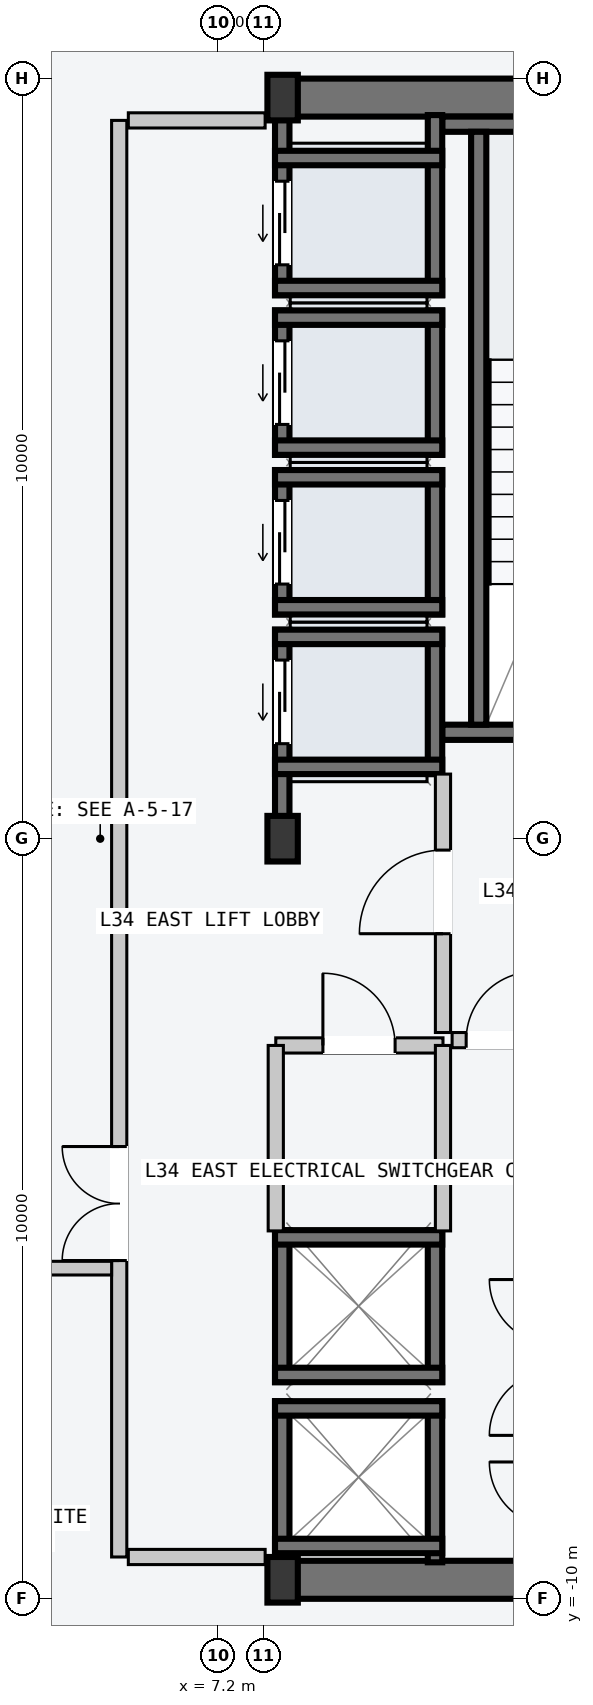
"""IFC4 building model, lengths in metres.
Left out: names, types, materials, properties, quantities, classifications, styles, units other than length and angle.
Written with IfcOpenShell. Run it as: python <this file> out.ifc"""

import sys

from ifc_helpers import new_model, si_unit, direction, frame, frame_2d, origin, origin_2d, place, context, subcontext, project, spatial, rectangle, i_section, extrude, element, fill, save


model = new_model("IFC4")
c1 = context("Model", 3, precision=1e-05, world=origin(), true_north=direction((0.0, 1.0)))
c2 = subcontext(c1, "Body", "Model", "MODEL_VIEW")
j1 = project(units=[si_unit("LENGTHUNIT", "METRE"), si_unit("PLANEANGLEUNIT", "RADIAN")], contexts=[c1])
p1 = place(None, origin())
s1 = spatial("IfcSite", under=j1, at=p1, CompositionType="ELEMENT")
p2 = place(p1, origin())
s2 = spatial("IfcBuilding", under=s1, at=p2, CompositionType="ELEMENT")
p3 = place(p2, frame((0.0, 0.0, 131.4)))
s3 = spatial("IfcBuildingStorey", under=s2, at=p3, CompositionType="ELEMENT", Elevation=131.4)
for number, where, z_axis, x_axis in (
    (1, (8.07, -9.75, -0.2), (0.0, 0.0, 1.0), (1.0, 0.0, 0.0)),
    (2, (8.07, 9.75, -0.2), (0.0, 0.0, 1.0), (1.0, 0.0, 0.0)),
):
    element("IfcWall", number, at=place(p3, frame(where, z_axis=z_axis, x_axis=x_axis)), inside=s3, PredefinedType="SHEAR", context=c2, shape_type="SweptSolid", body=[
        extrude(rectangle(XDim=6.46, YDim=0.5, at=frame_2d((3.23, 0.0))), origin(), (0.0, 0.0, 1.0), 3.6),
    ])
p4 = place(p3, frame((10.15, 1.4, -0.2), z_axis=(0.0, 0.0, 1.0), x_axis=(1.0, 0.0, 0.0)))
e3 = element("IfcWall", 3, at=p4, inside=s3, PredefinedType="SOLIDWALL", context=c2, shape_type="SweptSolid", body=[
    extrude(rectangle(XDim=4.1, YDim=0.2, at=frame_2d((2.05, 0.0))), origin(), (0.0, 0.0, 1.0), 3.6),
])
p5 = place(p4, frame((1.5, 0.0, 0.2)))
e4 = element("IfcOpeningElement", 4, at=p5, cuts=e3, PredefinedType="OPENING", context=c2, shape_type="SweptSolid", body=[
    extrude(rectangle(XDim=1.12, YDim=2.18, at=frame_2d((0.56, 1.09))), frame((0.0, 0.11, 0.0), z_axis=(0.0, -1.0, 0.0), x_axis=(1.0, 0.0, 0.0)), (0.0, 0.0, 1.0), 0.22),
])
p6 = place(p3, frame((10.15, 9.4, -0.2), z_axis=(0.0, 0.0, 1.0), x_axis=(1.0, 0.0, 0.0)))
e5 = element("IfcWall", 5, at=p6, inside=s3, PredefinedType="SOLIDWALL", context=c2, shape_type="SweptSolid", body=[
    extrude(rectangle(XDim=4.1, YDim=0.2, at=frame_2d((2.05, 0.0))), origin(), (0.0, 0.0, 1.0), 3.6),
])
p7 = place(p3, frame((10.63, 1.5, -0.2), z_axis=(0.0, 0.0, 1.0), x_axis=(0.0, 1.0, 0.0)))
e6 = element("IfcWall", 6, at=p7, inside=s3, PredefinedType="SOLIDWALL", context=c2, shape_type="SweptSolid", body=[
    extrude(rectangle(XDim=7.8, YDim=0.2, at=frame_2d((3.9, 0.0))), origin(), (0.0, 0.0, 1.0), 3.6),
])
for number, where, z_axis, x_axis in (
    (7, (8.05, -9.75, 0.0), (0.0, 0.0, 1.0), (1.0, 0.0, 0.0)),
    (8, (8.05, 0.0, 0.0), (0.0, 0.0, 1.0), (1.0, 0.0, 0.0)),
    (9, (8.05, 9.75, 0.0), (0.0, 0.0, 1.0), (1.0, 0.0, 0.0)),
):
    element("IfcColumn", number, at=place(p3, frame(where, z_axis=z_axis, x_axis=x_axis)), inside=s3, PredefinedType="COLUMN", context=c2, shape_type="SweptSolid", body=[
        extrude(i_section(OverallWidth=0.4, OverallDepth=0.6, WebThickness=0.022, FlangeThickness=0.036, at=origin_2d()), origin(), (0.0, 0.0, 1.0), 3.6),
    ])
p8 = place(p3, frame((8.045, 0.21, -0.2), z_axis=(0.0, 0.0, 1.0), x_axis=(0.0, 1.0, 0.0)))
e10 = element("IfcWall", 10, at=p8, inside=s3, PredefinedType="SOLIDWALL", context=c2, shape_type="SweptSolid", body=[
    extrude(rectangle(XDim=2.54, YDim=0.19, at=frame_2d((1.27, 0.0))), origin(), (0.0, 0.0, 1.0), 3.6),
])
p9 = place(p8, frame((1.04, 0.0, 0.2)))
e11 = element("IfcOpeningElement", 11, at=p9, cuts=e10, PredefinedType="OPENING", context=c2, shape_type="SweptSolid", body=[
    extrude(rectangle(XDim=1.1, YDim=2.2, at=frame_2d((0.55, 1.1))), frame((0.0, 0.105, 0.0), z_axis=(0.0, -1.0, 0.0), x_axis=(1.0, 0.0, 0.0)), (0.0, 0.0, 1.0), 0.21),
])
p10 = place(p3, frame((10.055, 0.85, -0.2), z_axis=(0.0, 0.0, 1.0), x_axis=(0.0, 1.0, 0.0)))
e12 = element("IfcWall", 12, at=p10, inside=s3, PredefinedType="SOLIDWALL", context=c2, shape_type="SweptSolid", body=[
    extrude(rectangle(XDim=1.9, YDim=0.19, at=frame_2d((0.95, 0.0))), origin(), (0.0, 0.0, 1.0), 3.6),
])
for number, where, z_axis, x_axis in (
    (13, (7.95, 2.655, -0.2), (0.0, 0.0, 1.0), (1.0, 0.0, 0.0)),
    (14, (7.95, 0.945, -0.2), (0.0, 0.0, 1.0), (1.0, 0.0, 0.0)),
):
    element("IfcWall", number, at=place(p3, frame(where, z_axis=z_axis, x_axis=x_axis)), inside=s3, PredefinedType="SOLIDWALL", context=c2, shape_type="SweptSolid", body=[
        extrude(rectangle(XDim=2.2, YDim=0.19, at=frame_2d((1.1, 0.0))), origin(), (0.0, 0.0, 1.0), 3.6),
    ])
p11 = place(p3, frame((8.045, 2.95, -0.2), z_axis=(0.0, 0.0, 1.0), x_axis=(0.0, 1.0, 0.0)))
e15 = element("IfcWall", 15, at=p11, inside=s3, PredefinedType="SOLIDWALL", context=c2, shape_type="SweptSolid", body=[
    extrude(rectangle(XDim=1.9, YDim=0.19, at=frame_2d((0.95, 0.0))), origin(), (0.0, 0.0, 1.0), 3.6),
])
p12 = place(p11, frame((0.4, 0.0, 0.2)))
e16 = element("IfcOpeningElement", 16, at=p12, cuts=e15, PredefinedType="OPENING", context=c2, shape_type="SweptSolid", body=[
    extrude(rectangle(XDim=1.1, YDim=2.2, at=frame_2d((0.55, 1.1))), frame((0.0, 0.105, 0.0), z_axis=(0.0, -1.0, 0.0), x_axis=(1.0, 0.0, 0.0)), (0.0, 0.0, 1.0), 0.21),
])
p13 = place(p3, frame((10.055, 2.95, -0.2), z_axis=(0.0, 0.0, 1.0), x_axis=(0.0, 1.0, 0.0)))
e17 = element("IfcWall", 17, at=p13, inside=s3, PredefinedType="SOLIDWALL", context=c2, shape_type="SweptSolid", body=[
    extrude(rectangle(XDim=1.9, YDim=0.19, at=frame_2d((0.95, 0.0))), origin(), (0.0, 0.0, 1.0), 3.6),
])
for number, where, z_axis, x_axis in (
    (18, (7.95, 4.755, -0.2), (0.0, 0.0, 1.0), (1.0, 0.0, 0.0)),
    (19, (7.95, 3.045, -0.2), (0.0, 0.0, 1.0), (1.0, 0.0, 0.0)),
):
    element("IfcWall", number, at=place(p3, frame(where, z_axis=z_axis, x_axis=x_axis)), inside=s3, PredefinedType="SOLIDWALL", context=c2, shape_type="SweptSolid", body=[
        extrude(rectangle(XDim=2.2, YDim=0.19, at=frame_2d((1.1, 0.0))), origin(), (0.0, 0.0, 1.0), 3.6),
    ])
p14 = place(p3, frame((8.045, 5.05, -0.2), z_axis=(0.0, 0.0, 1.0), x_axis=(0.0, 1.0, 0.0)))
e20 = element("IfcWall", 20, at=p14, inside=s3, PredefinedType="SOLIDWALL", context=c2, shape_type="SweptSolid", body=[
    extrude(rectangle(XDim=1.9, YDim=0.19, at=frame_2d((0.95, 0.0))), origin(), (0.0, 0.0, 1.0), 3.6),
])
p15 = place(p14, frame((0.4, 0.0, 0.2)))
e21 = element("IfcOpeningElement", 21, at=p15, cuts=e20, PredefinedType="OPENING", context=c2, shape_type="SweptSolid", body=[
    extrude(rectangle(XDim=1.1, YDim=2.2, at=frame_2d((0.55, 1.1))), frame((0.0, 0.105, 0.0), z_axis=(0.0, -1.0, 0.0), x_axis=(1.0, 0.0, 0.0)), (0.0, 0.0, 1.0), 0.21),
])
p16 = place(p3, frame((10.055, 5.05, -0.2), z_axis=(0.0, 0.0, 1.0), x_axis=(0.0, 1.0, 0.0)))
e22 = element("IfcWall", 22, at=p16, inside=s3, PredefinedType="SOLIDWALL", context=c2, shape_type="SweptSolid", body=[
    extrude(rectangle(XDim=1.9, YDim=0.19, at=frame_2d((0.95, 0.0))), origin(), (0.0, 0.0, 1.0), 3.6),
])
for number, where, z_axis, x_axis in (
    (23, (7.95, 6.855, -0.2), (0.0, 0.0, 1.0), (1.0, 0.0, 0.0)),
    (24, (7.95, 5.145, -0.2), (0.0, 0.0, 1.0), (1.0, 0.0, 0.0)),
):
    element("IfcWall", number, at=place(p3, frame(where, z_axis=z_axis, x_axis=x_axis)), inside=s3, PredefinedType="SOLIDWALL", context=c2, shape_type="SweptSolid", body=[
        extrude(rectangle(XDim=2.2, YDim=0.19, at=frame_2d((1.1, 0.0))), origin(), (0.0, 0.0, 1.0), 3.6),
    ])
p17 = place(p3, frame((8.045, 7.15, -0.2), z_axis=(0.0, 0.0, 1.0), x_axis=(0.0, 1.0, 0.0)))
e25 = element("IfcWall", 25, at=p17, inside=s3, PredefinedType="SOLIDWALL", context=c2, shape_type="SweptSolid", body=[
    extrude(rectangle(XDim=2.37, YDim=0.19, at=frame_2d((1.185, 0.0))), origin(), (0.0, 0.0, 1.0), 3.6),
])
p18 = place(p17, frame((0.4, 0.0, 0.2)))
e26 = element("IfcOpeningElement", 26, at=p18, cuts=e25, PredefinedType="OPENING", context=c2, shape_type="SweptSolid", body=[
    extrude(rectangle(XDim=1.1, YDim=2.2, at=frame_2d((0.55, 1.1))), frame((0.0, 0.105, 0.0), z_axis=(0.0, -1.0, 0.0), x_axis=(1.0, 0.0, 0.0)), (0.0, 0.0, 1.0), 0.21),
])
p19 = place(p3, frame((10.055, 7.15, -0.2), z_axis=(0.0, 0.0, 1.0), x_axis=(0.0, 1.0, 0.0)))
e27 = element("IfcWall", 27, at=p19, inside=s3, PredefinedType="SOLIDWALL", context=c2, shape_type="SweptSolid", body=[
    extrude(rectangle(XDim=2.37, YDim=0.19, at=frame_2d((1.185, 0.0))), origin(), (0.0, 0.0, 1.0), 3.6),
])
for number, where, z_axis, x_axis in (
    (28, (7.95, 8.955, -0.2), (0.0, 0.0, 1.0), (1.0, 0.0, 0.0)),
    (29, (7.95, 7.245, -0.2), (0.0, 0.0, 1.0), (1.0, 0.0, 0.0)),
):
    element("IfcWall", number, at=place(p3, frame(where, z_axis=z_axis, x_axis=x_axis)), inside=s3, PredefinedType="SOLIDWALL", context=c2, shape_type="SweptSolid", body=[
        extrude(rectangle(XDim=2.2, YDim=0.19, at=frame_2d((1.1, 0.0))), origin(), (0.0, 0.0, 1.0), 3.6),
    ])
for number, where, z_axis, x_axis in (
    (30, (8.045, -9.52, -0.2), (0.0, 0.0, 1.0), (0.0, 1.0, 0.0)),
    (31, (10.055, -9.52, -0.2), (0.0, 0.0, 1.0), (0.0, 1.0, 0.0)),
):
    element("IfcWall", number, at=place(p3, frame(where, z_axis=z_axis, x_axis=x_axis)), inside=s3, PredefinedType="SOLIDWALL", context=c2, shape_type="SweptSolid", body=[
        extrude(rectangle(XDim=2.12, YDim=0.19, at=frame_2d((1.06, 0.0))), origin(), (0.0, 0.0, 1.0), 3.6),
    ])
for number, where, z_axis, x_axis in (
    (32, (7.95, -7.495, -0.2), (0.0, 0.0, 1.0), (1.0, 0.0, 0.0)),
    (33, (7.95, -9.305, -0.2), (0.0, 0.0, 1.0), (1.0, 0.0, 0.0)),
):
    element("IfcWall", number, at=place(p3, frame(where, z_axis=z_axis, x_axis=x_axis)), inside=s3, PredefinedType="SOLIDWALL", context=c2, shape_type="SweptSolid", body=[
        extrude(rectangle(XDim=2.2, YDim=0.19, at=frame_2d((1.1, 0.0))), origin(), (0.0, 0.0, 1.0), 3.6),
    ])
for number, where, z_axis, x_axis in (
    (34, (8.045, -7.15, -0.2), (0.0, 0.0, 1.0), (0.0, 1.0, 0.0)),
    (35, (10.055, -7.15, -0.2), (0.0, 0.0, 1.0), (0.0, 1.0, 0.0)),
):
    element("IfcWall", number, at=place(p3, frame(where, z_axis=z_axis, x_axis=x_axis)), inside=s3, PredefinedType="SOLIDWALL", context=c2, shape_type="SweptSolid", body=[
        extrude(rectangle(XDim=2.0, YDim=0.19, at=frame_2d((1.0, 0.0))), origin(), (0.0, 0.0, 1.0), 3.6),
    ])
for number, where, z_axis, x_axis in (
    (36, (7.95, -5.245, -0.2), (0.0, 0.0, 1.0), (1.0, 0.0, 0.0)),
    (37, (7.95, -7.055, -0.2), (0.0, 0.0, 1.0), (1.0, 0.0, 0.0)),
):
    element("IfcWall", number, at=place(p3, frame(where, z_axis=z_axis, x_axis=x_axis)), inside=s3, PredefinedType="SOLIDWALL", context=c2, shape_type="SweptSolid", body=[
        extrude(rectangle(XDim=2.2, YDim=0.19, at=frame_2d((1.1, 0.0))), origin(), (0.0, 0.0, 1.0), 3.6),
    ])
p20 = place(p3, frame((5.9, -9.45, 0.0), z_axis=(0.0, 0.0, 1.0), x_axis=(0.0, 1.0, 0.0)))
e38 = element("IfcWall", 38, at=p20, inside=s3, PredefinedType="PARTITIONING", context=c2, shape_type="SweptSolid", body=[
    extrude(rectangle(XDim=18.9, YDim=0.2, at=frame_2d((9.45, 0.0))), origin(), (0.0, 0.0, 1.0), 3.4),
])
p21 = place(p20, frame((3.9, 0.0, 0.0)))
e39 = element("IfcOpeningElement", 39, at=p21, cuts=e38, PredefinedType="OPENING", context=c2, shape_type="SweptSolid", body=[
    extrude(rectangle(XDim=1.5, YDim=2.2, at=frame_2d((0.75, 1.1))), frame((0.0, 0.11, 0.0), z_axis=(0.0, -1.0, 0.0), x_axis=(1.0, 0.0, 0.0)), (0.0, 0.0, 1.0), 0.22),
])
for number, where, z_axis, x_axis in (
    (40, (6.02, -9.45, 0.0), (0.0, 0.0, 1.0), (1.0, 0.0, 0.0)),
    (41, (6.02, 9.45, 0.0), (0.0, 0.0, 1.0), (1.0, 0.0, 0.0)),
):
    element("IfcWall", number, at=place(p3, frame(where, z_axis=z_axis, x_axis=x_axis)), inside=s3, PredefinedType="PARTITIONING", context=c2, shape_type="SweptSolid", body=[
        extrude(rectangle(XDim=1.8, YDim=0.2, at=frame_2d((0.9, 0.0))), origin(), (0.0, 0.0, 1.0), 3.4),
    ])
p22 = place(p3, frame((10.16, -2.55, 0.0), z_axis=(0.0, 0.0, 1.0), x_axis=(0.0, 1.0, 0.0)))
e42 = element("IfcWall", 42, at=p22, inside=s3, PredefinedType="PARTITIONING", context=c2, shape_type="SweptSolid", body=[
    extrude(rectangle(XDim=3.4, YDim=0.2, at=frame_2d((1.7, 0.0))), origin(), (0.0, 0.0, 1.0), 3.4),
])
p23 = place(p22, frame((1.3, 0.0, 0.0)))
e43 = element("IfcOpeningElement", 43, at=p23, cuts=e42, PredefinedType="OPENING", context=c2, shape_type="SweptSolid", body=[
    extrude(rectangle(XDim=1.1, YDim=2.15, at=frame_2d((0.55, 1.075))), frame((0.0, 0.11, 0.0), z_axis=(0.0, -1.0, 0.0), x_axis=(1.0, 0.0, 0.0)), (0.0, 0.0, 1.0), 0.22),
])
p24 = place(p3, frame((10.28, -2.65, 0.0), z_axis=(0.0, 0.0, 1.0), x_axis=(1.0, 0.0, 0.0)))
e44 = element("IfcWall", 44, at=p24, inside=s3, PredefinedType="PARTITIONING", context=c2, shape_type="SweptSolid", body=[
    extrude(rectangle(XDim=1.27, YDim=0.2, at=frame_2d((0.635, 0.0))), origin(), (0.0, 0.0, 1.0), 3.4),
])
p25 = place(p24, frame((0.185, 0.0, 0.0)))
e45 = element("IfcOpeningElement", 45, at=p25, cuts=e44, PredefinedType="OPENING", context=c2, shape_type="SweptSolid", body=[
    extrude(rectangle(XDim=0.9, YDim=2.15, at=frame_2d((0.45, 1.075))), frame((0.0, 0.11, 0.0), z_axis=(0.0, -1.0, 0.0), x_axis=(1.0, 0.0, 0.0)), (0.0, 0.0, 1.0), 0.22),
])
p26 = place(p3, frame((7.96, -2.72, 0.0), z_axis=(0.0, 0.0, 1.0), x_axis=(1.0, 0.0, 0.0)))
e46 = element("IfcWall", 46, at=p26, inside=s3, PredefinedType="PARTITIONING", context=c2, shape_type="SweptSolid", body=[
    extrude(rectangle(XDim=2.2, YDim=0.2, at=frame_2d((1.1, 0.0))), origin(), (0.0, 0.0, 1.0), 3.4),
])
p27 = place(p26, frame((0.62, 0.0, 0.0)))
e47 = element("IfcOpeningElement", 47, at=p27, cuts=e46, PredefinedType="OPENING", context=c2, shape_type="SweptSolid", body=[
    extrude(rectangle(XDim=0.95, YDim=2.1, at=frame_2d((0.475, 1.05))), frame((0.0, 0.11, 0.0), z_axis=(0.0, -1.0, 0.0), x_axis=(1.0, 0.0, 0.0)), (0.0, 0.0, 1.0), 0.22),
])
for number, where, z_axis, x_axis in (
    (48, (7.96, -5.16, 0.0), (0.0, 0.0, 1.0), (0.0, 1.0, 0.0)),
    (49, (10.16, -5.16, 0.0), (0.0, 0.0, 1.0), (0.0, 1.0, 0.0)),
):
    element("IfcWall", number, at=place(p3, frame(where, z_axis=z_axis, x_axis=x_axis)), inside=s3, PredefinedType="PARTITIONING", context=c2, shape_type="SweptSolid", body=[
        extrude(rectangle(XDim=2.44, YDim=0.2, at=frame_2d((1.22, 0.0))), origin(), (0.0, 0.0, 1.0), 3.4),
    ])
p28 = place(p3, frame((-5.8, -5.65, 0.0), z_axis=(0.0, 0.0, 1.0), x_axis=(1.0, 0.0, 0.0)))
e50 = element("IfcWall", 50, at=p28, inside=s3, PredefinedType="PARTITIONING", context=c2, shape_type="SweptSolid", body=[
    extrude(rectangle(XDim=11.6, YDim=0.18, at=frame_2d((5.8, 0.0))), origin(), (0.0, 0.0, 1.0), 3.4),
])
p29 = place(p28, frame((5.1, 0.0, 0.0)))
e51 = element("IfcOpeningElement", 51, at=p29, cuts=e50, PredefinedType="OPENING", context=c2, shape_type="SweptSolid", body=[
    extrude(rectangle(XDim=1.4, YDim=2.2, at=frame_2d((0.7, 1.1))), frame((0.0, 0.1, 0.0), z_axis=(0.0, -1.0, 0.0), x_axis=(1.0, 0.0, 0.0)), (0.0, 0.0, 1.0), 0.2),
])
p30 = place(p9, origin())
e52 = element("IfcDoor", 52, at=p30, inside=s3, OperationType="SLIDING_TO_LEFT", PredefinedType="DOOR", context=c2, shape_type="SweptSolid", body=[
    extrude(rectangle(XDim=1.1, YDim=2.2, at=frame_2d((0.55, 1.1))), frame((0.0, 0.025, 0.0), z_axis=(0.0, -1.0, 0.0), x_axis=(1.0, 0.0, 0.0)), (0.0, 0.0, 1.0), 0.05),
])
fill(e11, e52)
p31 = place(p12, origin())
e53 = element("IfcDoor", 53, at=p31, inside=s3, OperationType="SLIDING_TO_LEFT", PredefinedType="DOOR", context=c2, shape_type="SweptSolid", body=[
    extrude(rectangle(XDim=1.1, YDim=2.2, at=frame_2d((0.55, 1.1))), frame((0.0, 0.025, 0.0), z_axis=(0.0, -1.0, 0.0), x_axis=(1.0, 0.0, 0.0)), (0.0, 0.0, 1.0), 0.05),
])
fill(e16, e53)
p32 = place(p15, origin())
e54 = element("IfcDoor", 54, at=p32, inside=s3, OperationType="SLIDING_TO_LEFT", PredefinedType="DOOR", context=c2, shape_type="SweptSolid", body=[
    extrude(rectangle(XDim=1.1, YDim=2.2, at=frame_2d((0.55, 1.1))), frame((0.0, 0.025, 0.0), z_axis=(0.0, -1.0, 0.0), x_axis=(1.0, 0.0, 0.0)), (0.0, 0.0, 1.0), 0.05),
])
fill(e21, e54)
p33 = place(p18, origin())
e55 = element("IfcDoor", 55, at=p33, inside=s3, OperationType="SLIDING_TO_LEFT", PredefinedType="DOOR", context=c2, shape_type="SweptSolid", body=[
    extrude(rectangle(XDim=1.1, YDim=2.2, at=frame_2d((0.55, 1.1))), frame((0.0, 0.025, 0.0), z_axis=(0.0, -1.0, 0.0), x_axis=(1.0, 0.0, 0.0)), (0.0, 0.0, 1.0), 0.05),
])
fill(e26, e55)
p34 = place(p21, origin())
e56 = element("IfcDoor", 56, at=p34, inside=s3, OperationType="DOUBLE_DOOR_SINGLE_SWING", PredefinedType="DOOR", context=c2, shape_type="SweptSolid", body=[
    extrude(rectangle(XDim=1.5, YDim=2.2, at=frame_2d((0.75, 1.1))), frame((0.0, 0.025, 0.0), z_axis=(0.0, -1.0, 0.0), x_axis=(1.0, 0.0, 0.0)), (0.0, 0.0, 1.0), 0.05),
])
fill(e39, e56)
p35 = place(p23, origin())
e57 = element("IfcDoor", 57, at=p35, inside=s3, OperationType="SINGLE_SWING_LEFT", PredefinedType="DOOR", context=c2, shape_type="SweptSolid", body=[
    extrude(rectangle(XDim=1.1, YDim=2.15, at=frame_2d((0.55, 1.075))), frame((0.0, 0.025, 0.0), z_axis=(0.0, -1.0, 0.0), x_axis=(1.0, 0.0, 0.0)), (0.0, 0.0, 1.0), 0.05),
])
fill(e43, e57)
p36 = place(p25, origin())
e58 = element("IfcDoor", 58, at=p36, inside=s3, OperationType="SINGLE_SWING_RIGHT", PredefinedType="DOOR", context=c2, shape_type="SweptSolid", body=[
    extrude(rectangle(XDim=0.9, YDim=2.15, at=frame_2d((0.45, 1.075))), frame((0.0, 0.025, 0.0), z_axis=(0.0, -1.0, 0.0), x_axis=(1.0, 0.0, 0.0)), (0.0, 0.0, 1.0), 0.05),
])
fill(e45, e58)
p37 = place(p27, origin())
e59 = element("IfcDoor", 59, at=p37, inside=s3, OperationType="SINGLE_SWING_LEFT", PredefinedType="DOOR", context=c2, shape_type="SweptSolid", body=[
    extrude(rectangle(XDim=0.95, YDim=2.1, at=frame_2d((0.475, 1.05))), frame((0.0, 0.025, 0.0), z_axis=(0.0, -1.0, 0.0), x_axis=(1.0, 0.0, 0.0)), (0.0, 0.0, 1.0), 0.05),
])
fill(e47, e59)
save(model, sys.argv[1])
